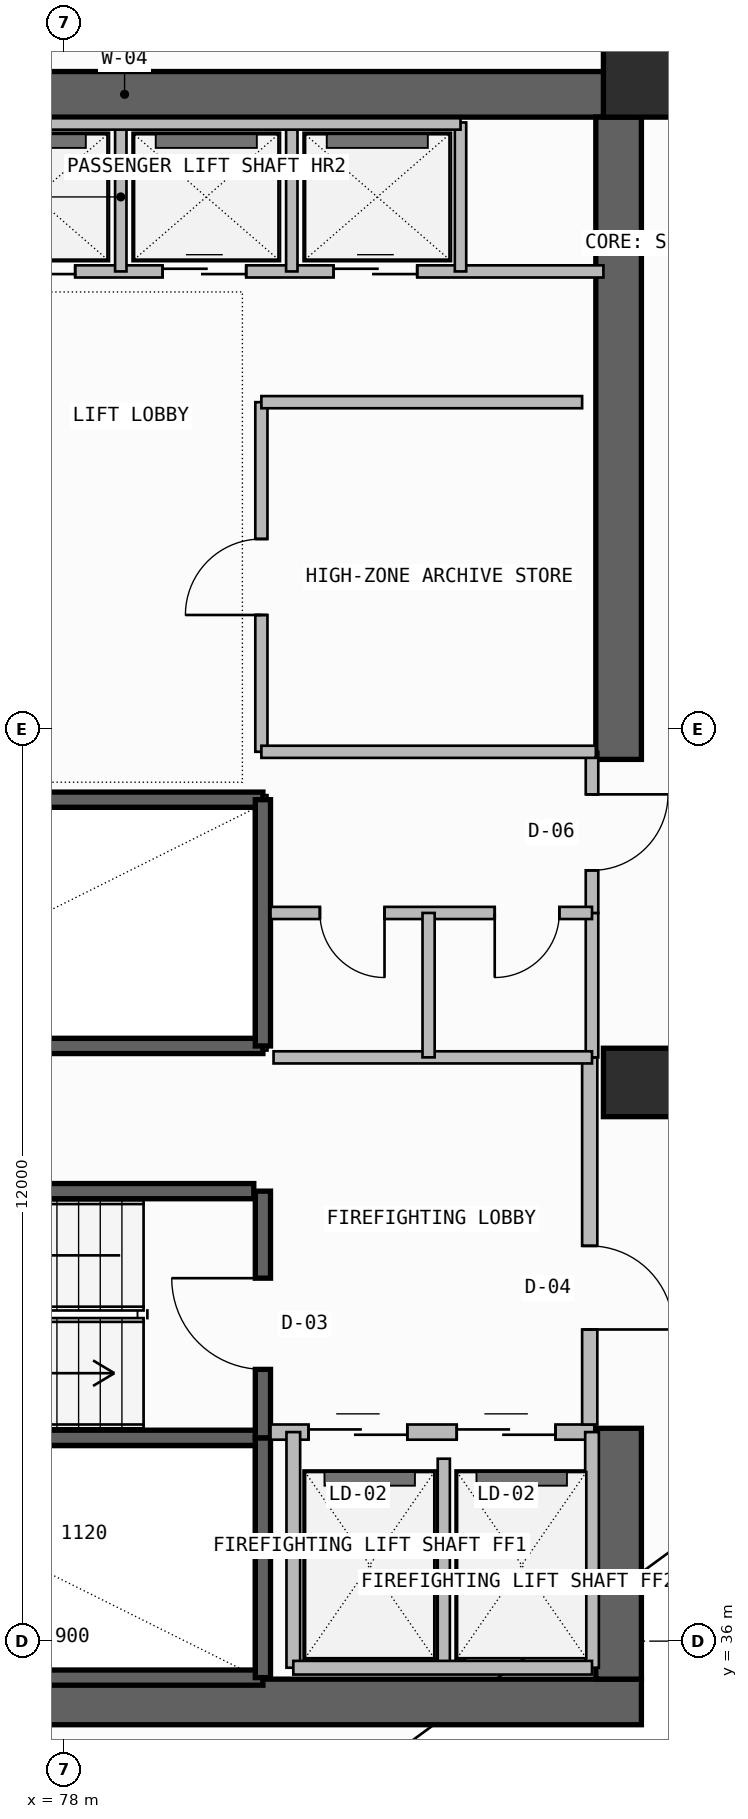
"""IFC4 building model, lengths in metres.
Left out: names, types, materials, properties, quantities, classifications, styles, units other than length and angle.
Written with IfcOpenShell. Run it as: python <this file> out.ifc"""

import sys

from ifc_helpers import new_model, si_unit, direction, frame, frame_2d, origin, origin_2d, place, context, subcontext, project, spatial, rectangle, extrude, element, fill, save


model = new_model("IFC4")
c1 = context("Model", 3, precision=1e-05, world=origin(), true_north=direction((0.0, 1.0)))
c2 = subcontext(c1, "Body", "Model", "MODEL_VIEW")
j1 = project(units=[si_unit("LENGTHUNIT", "METRE"), si_unit("PLANEANGLEUNIT", "RADIAN")], contexts=[c1])
p1 = place(None, origin())
s1 = spatial("IfcSite", under=j1, at=p1, CompositionType="ELEMENT")
p2 = place(p1, origin())
s2 = spatial("IfcBuilding", under=s1, at=p2, CompositionType="ELEMENT")
p3 = place(p2, frame((0.0, 0.0, 239.62)))
s3 = spatial("IfcBuildingStorey", under=s2, at=p3, CompositionType="ELEMENT", Elevation=239.62)
p4 = place(p3, frame((72.3, 35.2, -0.26), z_axis=(0.0, 0.0, 1.0), x_axis=(1.0, 0.0, 0.0)))
e1 = element("IfcWall", 1, at=p4, inside=s3, PredefinedType="SHEAR", context=c2, shape_type="SweptSolid", body=[
    extrude(rectangle(XDim=13.3, YDim=0.6, at=frame_2d((6.65, 0.0))), origin(), (0.0, 0.0, 1.0), 3.52),
])
p5 = place(p3, frame((85.3, 35.5, -0.26), z_axis=(0.0, 0.0, 1.0), x_axis=(0.0, 1.0, 0.0)))
e2 = element("IfcWall", 2, at=p5, inside=s3, PredefinedType="SHEAR", context=c2, shape_type="SweptSolid", body=[
    extrude(rectangle(XDim=3.3, YDim=0.6, at=frame_2d((1.65, 0.0))), origin(), (0.0, 0.0, 1.0), 3.52),
])
p6 = place(p3, frame((72.0, 56.35, -0.26), z_axis=(0.0, 0.0, 1.0), x_axis=(1.0, 0.0, 0.0)))
e3 = element("IfcWall", 3, at=p6, inside=s3, PredefinedType="SHEAR", context=c2, shape_type="SweptSolid", body=[
    extrude(rectangle(XDim=13.6, YDim=0.6, at=frame_2d((6.8, 0.0))), origin(), (0.0, 0.0, 1.0), 3.52),
])
p7 = place(p3, frame((85.3, 47.6, -0.26), z_axis=(0.0, 0.0, 1.0), x_axis=(0.0, 1.0, 0.0)))
e4 = element("IfcWall", 4, at=p7, inside=s3, PredefinedType="SHEAR", context=c2, shape_type="SweptSolid", body=[
    extrude(rectangle(XDim=8.45, YDim=0.6, at=frame_2d((4.225, 0.0))), origin(), (0.0, 0.0, 1.0), 3.52),
])
for number, where, z_axis, x_axis in (
    (5, (85.55, 43.35, 0.0), (0.0, 0.0, 1.0), (1.0, 0.0, 0.0)),
    (6, (85.55, 56.5, 0.0), (0.0, 0.0, 1.0), (1.0, 0.0, 0.0)),
):
    element("IfcColumn", number, at=place(p3, frame(where, z_axis=z_axis, x_axis=x_axis)), inside=s3, PredefinedType="COLUMN", context=c2, shape_type="SweptSolid", body=[
        extrude(rectangle(XDim=0.9, YDim=0.9, at=origin_2d()), origin(), (0.0, 0.0, 1.0), 3.52),
    ])
for number, where, z_axis, x_axis in (
    (7, (72.92, 35.52, -0.26), (0.0, 0.0, 1.0), (1.0, 0.0, 0.0)),
    (8, (72.92, 38.675, -0.26), (0.0, 0.0, 1.0), (1.0, 0.0, 0.0)),
):
    element("IfcWall", number, at=place(p3, frame(where, z_axis=z_axis, x_axis=x_axis)), inside=s3, PredefinedType="SOLIDWALL", context=c2, shape_type="SweptSolid", body=[
        extrude(rectangle(XDim=7.7, YDim=0.2, at=frame_2d((3.85, 0.0))), origin(), (0.0, 0.0, 1.0), 3.52),
    ])
p8 = place(p3, frame((80.62, 35.52, -0.26), z_axis=(0.0, 0.0, 1.0), x_axis=(0.0, 1.0, 0.0)))
e9 = element("IfcWall", 9, at=p8, inside=s3, PredefinedType="SOLIDWALL", context=c2, shape_type="SweptSolid", body=[
    extrude(rectangle(XDim=3.155, YDim=0.2, at=frame_2d((1.578, 0.0))), origin(), (0.0, 0.0, 1.0), 3.52),
])
p9 = place(p3, frame((80.62, 38.675, -0.26), z_axis=(0.0, 0.0, 1.0), x_axis=(0.0, 1.0, 0.0)))
e10 = element("IfcWall", 10, at=p9, inside=s3, PredefinedType="SOLIDWALL", context=c2, shape_type="SweptSolid", body=[
    extrude(rectangle(XDim=3.245, YDim=0.2, at=frame_2d((1.623, 0.0))), origin(), (0.0, 0.0, 1.0), 3.52),
])
p10 = place(p9, frame((0.9, 0.0, 0.26)))
e11 = element("IfcOpeningElement", 11, at=p10, cuts=e10, PredefinedType="OPENING", context=c2, shape_type="SweptSolid", body=[
    extrude(rectangle(XDim=1.2, YDim=2.2, at=frame_2d((0.6, 1.1))), frame((0.0, 0.11, 0.0), z_axis=(0.0, -1.0, 0.0), x_axis=(1.0, 0.0, 0.0)), (0.0, 0.0, 1.0), 0.22),
])
p11 = place(p3, frame((80.72, 38.75, 0.0), z_axis=(0.0, 0.0, 1.0), x_axis=(1.0, 0.0, 0.0)))
e12 = element("IfcWall", 12, at=p11, inside=s3, PredefinedType="SOLIDWALL", context=c2, shape_type="SweptSolid", body=[
    extrude(rectangle(XDim=4.26, YDim=0.2, at=frame_2d((2.13, 0.0))), origin(), (0.0, 0.0, 1.0), 3.26),
])
p12 = place(p11, frame((0.5, 0.0, 0.0)))
e13 = element("IfcOpeningElement", 13, at=p12, cuts=e12, PredefinedType="OPENING", context=c2, shape_type="SweptSolid", body=[
    extrude(rectangle(XDim=1.3, YDim=2.3, at=frame_2d((0.65, 1.15))), frame((0.0, 0.11, 0.0), z_axis=(0.0, -1.0, 0.0), x_axis=(1.0, 0.0, 0.0)), (0.0, 0.0, 1.0), 0.22),
])
p13 = place(p11, frame((2.45, 0.0, 0.0)))
e14 = element("IfcOpeningElement", 14, at=p13, cuts=e12, PredefinedType="OPENING", context=c2, shape_type="SweptSolid", body=[
    extrude(rectangle(XDim=1.3, YDim=2.3, at=frame_2d((0.65, 1.15))), frame((0.0, 0.11, 0.0), z_axis=(0.0, -1.0, 0.0), x_axis=(1.0, 0.0, 0.0)), (0.0, 0.0, 1.0), 0.22),
])
p14 = place(p3, frame((83.0, 35.65, 0.0), z_axis=(0.0, 0.0, 1.0), x_axis=(0.0, 1.0, 0.0)))
e15 = element("IfcWall", 15, at=p14, inside=s3, PredefinedType="PLUMBINGWALL", context=c2, shape_type="SweptSolid", body=[
    extrude(rectangle(XDim=2.75, YDim=0.16, at=frame_2d((1.375, 0.0))), origin(), (0.0, 0.0, 1.0), 3.26),
])
for number, where, z_axis, x_axis in (
    (16, (84.95, 35.65, 0.0), (0.0, 0.0, 1.0), (0.0, 1.0, 0.0)),
    (17, (81.02, 35.65, 0.0), (0.0, 0.0, 1.0), (0.0, 1.0, 0.0)),
):
    element("IfcWall", number, at=place(p3, frame(where, z_axis=z_axis, x_axis=x_axis)), inside=s3, PredefinedType="SOLIDWALL", context=c2, shape_type="SweptSolid", body=[
        extrude(rectangle(XDim=3.1, YDim=0.18, at=frame_2d((1.55, 0.0))), origin(), (0.0, 0.0, 1.0), 3.26),
    ])
p15 = place(p3, frame((81.02, 35.65, 0.0), z_axis=(0.0, 0.0, 1.0), x_axis=(1.0, 0.0, 0.0)))
e18 = element("IfcWall", 18, at=p15, inside=s3, PredefinedType="SOLIDWALL", context=c2, shape_type="SweptSolid", body=[
    extrude(rectangle(XDim=3.93, YDim=0.18, at=frame_2d((1.965, 0.0))), origin(), (0.0, 0.0, 1.0), 3.26),
])
p16 = place(p3, frame((84.92, 38.85, 0.0), z_axis=(0.0, 0.0, 1.0), x_axis=(0.0, 1.0, 0.0)))
e19 = element("IfcWall", 19, at=p16, inside=s3, PredefinedType="SOLIDWALL", context=c2, shape_type="SweptSolid", body=[
    extrude(rectangle(XDim=4.83, YDim=0.2, at=frame_2d((2.415, 0.0))), origin(), (0.0, 0.0, 1.0), 3.26),
])
p17 = place(p16, frame((1.25, 0.0, 0.0)))
e20 = element("IfcOpeningElement", 20, at=p17, cuts=e19, PredefinedType="OPENING", context=c2, shape_type="SweptSolid", body=[
    extrude(rectangle(XDim=1.1, YDim=2.2, at=frame_2d((0.55, 1.1))), frame((0.0, 0.11, 0.0), z_axis=(0.0, -1.0, 0.0), x_axis=(1.0, 0.0, 0.0)), (0.0, 0.0, 1.0), 0.22),
])
p18 = place(p3, frame((72.92, 41.92, -0.26), z_axis=(0.0, 0.0, 1.0), x_axis=(1.0, 0.0, 0.0)))
e21 = element("IfcWall", 21, at=p18, inside=s3, PredefinedType="SOLIDWALL", context=c2, shape_type="SweptSolid", body=[
    extrude(rectangle(XDim=7.58, YDim=0.2, at=frame_2d((3.79, 0.0))), origin(), (0.0, 0.0, 1.0), 3.52),
])
for number, where, z_axis, x_axis in (
    (22, (72.92, 43.83, -0.26), (0.0, 0.0, 1.0), (1.0, 0.0, 0.0)),
    (23, (72.92, 47.07, -0.26), (0.0, 0.0, 1.0), (1.0, 0.0, 0.0)),
):
    element("IfcWall", number, at=place(p3, frame(where, z_axis=z_axis, x_axis=x_axis)), inside=s3, PredefinedType="SOLIDWALL", context=c2, shape_type="SweptSolid", body=[
        extrude(rectangle(XDim=7.7, YDim=0.2, at=frame_2d((3.85, 0.0))), origin(), (0.0, 0.0, 1.0), 3.52),
    ])
p19 = place(p3, frame((80.62, 43.83, -0.26), z_axis=(0.0, 0.0, 1.0), x_axis=(0.0, 1.0, 0.0)))
e24 = element("IfcWall", 24, at=p19, inside=s3, PredefinedType="SOLIDWALL", context=c2, shape_type="SweptSolid", body=[
    extrude(rectangle(XDim=3.24, YDim=0.2, at=frame_2d((1.62, 0.0))), origin(), (0.0, 0.0, 1.0), 3.52),
])
p20 = place(p3, frame((84.95, 43.68, 0.0), z_axis=(0.0, 0.0, 1.0), x_axis=(0.0, 1.0, 0.0)))
e25 = element("IfcWall", 25, at=p20, inside=s3, PredefinedType="PLUMBINGWALL", context=c2, shape_type="SweptSolid", body=[
    extrude(rectangle(XDim=1.9, YDim=0.165, at=frame_2d((0.95, 0.0))), origin(), (0.0, 0.0, 1.0), 3.26),
])
p21 = place(p3, frame((84.95, 45.58, 0.0), z_axis=(0.0, 0.0, 1.0), x_axis=(0.0, 1.0, 0.0)))
e26 = element("IfcWall", 26, at=p21, inside=s3, PredefinedType="PARTITIONING", context=c2, shape_type="SweptSolid", body=[
    extrude(rectangle(XDim=2.12, YDim=0.165, at=frame_2d((1.06, 0.0))), origin(), (0.0, 0.0, 1.0), 3.26),
])
p22 = place(p21, frame((0.56, 0.0, 0.0)))
e27 = element("IfcOpeningElement", 27, at=p22, cuts=e26, PredefinedType="OPENING", context=c2, shape_type="SweptSolid", body=[
    extrude(rectangle(XDim=1.0, YDim=2.2, at=frame_2d((0.5, 1.1))), frame((0.0, 0.093, 0.0), z_axis=(0.0, -1.0, 0.0), x_axis=(1.0, 0.0, 0.0)), (0.0, 0.0, 1.0), 0.185),
])
p23 = place(p3, frame((80.72, 45.58, 0.0), z_axis=(0.0, 0.0, 1.0), x_axis=(1.0, 0.0, 0.0)))
e28 = element("IfcWall", 28, at=p23, inside=s3, PredefinedType="PLUMBINGWALL", context=c2, shape_type="SweptSolid", body=[
    extrude(rectangle(XDim=4.23, YDim=0.16, at=frame_2d((2.115, 0.0))), origin(), (0.0, 0.0, 1.0), 3.26),
])
p24 = place(p23, frame((0.65, 0.0, 0.0)))
e29 = element("IfcOpeningElement", 29, at=p24, cuts=e28, PredefinedType="OPENING", context=c2, shape_type="SweptSolid", body=[
    extrude(rectangle(XDim=0.85, YDim=2.05, at=frame_2d((0.425, 1.025))), frame((0.0, 0.09, 0.0), z_axis=(0.0, -1.0, 0.0), x_axis=(1.0, 0.0, 0.0)), (0.0, 0.0, 1.0), 0.18),
])
p25 = place(p23, frame((2.95, 0.0, 0.0)))
e30 = element("IfcOpeningElement", 30, at=p25, cuts=e28, PredefinedType="OPENING", context=c2, shape_type="SweptSolid", body=[
    extrude(rectangle(XDim=0.85, YDim=2.05, at=frame_2d((0.425, 1.025))), frame((0.0, 0.09, 0.0), z_axis=(0.0, -1.0, 0.0), x_axis=(1.0, 0.0, 0.0)), (0.0, 0.0, 1.0), 0.18),
])
p26 = place(p3, frame((80.76, 43.68, 0.0), z_axis=(0.0, 0.0, 1.0), x_axis=(1.0, 0.0, 0.0)))
e31 = element("IfcWall", 31, at=p26, inside=s3, PredefinedType="PLUMBINGWALL", context=c2, shape_type="SweptSolid", body=[
    extrude(rectangle(XDim=4.19, YDim=0.16, at=frame_2d((2.095, 0.0))), origin(), (0.0, 0.0, 1.0), 3.26),
])
p27 = place(p3, frame((82.8, 43.68, 0.0), z_axis=(0.0, 0.0, 1.0), x_axis=(0.0, 1.0, 0.0)))
e32 = element("IfcWall", 32, at=p27, inside=s3, PredefinedType="PLUMBINGWALL", context=c2, shape_type="SweptSolid", body=[
    extrude(rectangle(XDim=1.9, YDim=0.16, at=frame_2d((0.95, 0.0))), origin(), (0.0, 0.0, 1.0), 3.26),
])
p28 = place(p3, frame((80.6, 47.7, 0.0), z_axis=(0.0, 0.0, 1.0), x_axis=(0.0, 1.0, 0.0)))
e33 = element("IfcWall", 33, at=p28, inside=s3, PredefinedType="SOLIDWALL", context=c2, shape_type="SweptSolid", body=[
    extrude(rectangle(XDim=4.6, YDim=0.16, at=frame_2d((2.3, 0.0))), origin(), (0.0, 0.0, 1.0), 3.26),
])
p29 = place(p28, frame((1.8, 0.0, 0.0)))
e34 = element("IfcOpeningElement", 34, at=p29, cuts=e33, PredefinedType="OPENING", context=c2, shape_type="SweptSolid", body=[
    extrude(rectangle(XDim=1.0, YDim=2.2, at=frame_2d((0.5, 1.1))), frame((0.0, 0.09, 0.0), z_axis=(0.0, -1.0, 0.0), x_axis=(1.0, 0.0, 0.0)), (0.0, 0.0, 1.0), 0.18),
])
p30 = place(p3, frame((80.6, 47.7, 0.0), z_axis=(0.0, 0.0, 1.0), x_axis=(1.0, 0.0, 0.0)))
e35 = element("IfcWall", 35, at=p30, inside=s3, PredefinedType="SOLIDWALL", context=c2, shape_type="SweptSolid", body=[
    extrude(rectangle(XDim=4.4, YDim=0.16, at=frame_2d((2.2, 0.0))), origin(), (0.0, 0.0, 1.0), 3.26),
])
p31 = place(p3, frame((80.6, 52.3, 0.0), z_axis=(0.0, 0.0, 1.0), x_axis=(1.0, 0.0, 0.0)))
e36 = element("IfcWall", 36, at=p31, inside=s3, PredefinedType="SOLIDWALL", context=c2, shape_type="SweptSolid", body=[
    extrude(rectangle(XDim=4.22, YDim=0.16, at=frame_2d((2.11, 0.0))), origin(), (0.0, 0.0, 1.0), 3.26),
])
p32 = place(p3, frame((73.02, 54.02, 0.0), z_axis=(0.0, 0.0, 1.0), x_axis=(1.0, 0.0, 0.0)))
e37 = element("IfcWall", 37, at=p32, inside=s3, PredefinedType="SOLIDWALL", context=c2, shape_type="SweptSolid", body=[
    extrude(rectangle(XDim=12.08, YDim=0.16, at=frame_2d((6.04, 0.0))), origin(), (0.0, 0.0, 1.0), 3.26),
])
p33 = place(p32, frame((4.03, 0.0, 0.0)))
e38 = element("IfcOpeningElement", 38, at=p33, cuts=e37, PredefinedType="OPENING", context=c2, shape_type="SweptSolid", body=[
    extrude(rectangle(XDim=1.1, YDim=2.25, at=frame_2d((0.55, 1.125))), frame((0.0, 0.09, 0.0), z_axis=(0.0, -1.0, 0.0), x_axis=(1.0, 0.0, 0.0)), (0.0, 0.0, 1.0), 0.18),
])
p34 = place(p32, frame((6.28, 0.0, 0.0)))
e39 = element("IfcOpeningElement", 39, at=p34, cuts=e37, PredefinedType="OPENING", context=c2, shape_type="SweptSolid", body=[
    extrude(rectangle(XDim=1.1, YDim=2.25, at=frame_2d((0.55, 1.125))), frame((0.0, 0.09, 0.0), z_axis=(0.0, -1.0, 0.0), x_axis=(1.0, 0.0, 0.0)), (0.0, 0.0, 1.0), 0.18),
])
p35 = place(p32, frame((8.53, 0.0, 0.0)))
e40 = element("IfcOpeningElement", 40, at=p35, cuts=e37, PredefinedType="OPENING", context=c2, shape_type="SweptSolid", body=[
    extrude(rectangle(XDim=1.1, YDim=2.25, at=frame_2d((0.55, 1.125))), frame((0.0, 0.09, 0.0), z_axis=(0.0, -1.0, 0.0), x_axis=(1.0, 0.0, 0.0)), (0.0, 0.0, 1.0), 0.18),
])
for number, where, z_axis, x_axis in (
    (41, (78.75, 54.02, 0.0), (0.0, 0.0, 1.0), (0.0, 1.0, 0.0)),
    (42, (81.0, 54.02, 0.0), (0.0, 0.0, 1.0), (0.0, 1.0, 0.0)),
):
    element("IfcWall", number, at=place(p3, frame(where, z_axis=z_axis, x_axis=x_axis)), inside=s3, PredefinedType="PLUMBINGWALL", context=c2, shape_type="SweptSolid", body=[
        extrude(rectangle(XDim=1.96, YDim=0.15, at=frame_2d((0.98, 0.0))), origin(), (0.0, 0.0, 1.0), 3.26),
    ])
p36 = place(p3, frame((83.22, 54.02, 0.0), z_axis=(0.0, 0.0, 1.0), x_axis=(0.0, 1.0, 0.0)))
e43 = element("IfcWall", 43, at=p36, inside=s3, PredefinedType="SOLIDWALL", context=c2, shape_type="SweptSolid", body=[
    extrude(rectangle(XDim=1.96, YDim=0.15, at=frame_2d((0.98, 0.0))), origin(), (0.0, 0.0, 1.0), 3.26),
])
p37 = place(p3, frame((76.52, 55.96, 0.0), z_axis=(0.0, 0.0, 1.0), x_axis=(1.0, 0.0, 0.0)))
e44 = element("IfcWall", 44, at=p37, inside=s3, PredefinedType="SOLIDWALL", context=c2, shape_type="SweptSolid", body=[
    extrude(rectangle(XDim=6.7, YDim=0.15, at=frame_2d((3.35, 0.0))), origin(), (0.0, 0.0, 1.0), 3.26),
])
p38 = place(p10, origin())
e45 = element("IfcDoor", 45, at=p38, inside=s3, OperationType="SINGLE_SWING_RIGHT", PredefinedType="USERDEFINED", context=c2, shape_type="SweptSolid", body=[
    extrude(rectangle(XDim=1.2, YDim=2.2, at=frame_2d((0.6, 1.1))), frame((0.0, 0.025, 0.0), z_axis=(0.0, -1.0, 0.0), x_axis=(1.0, 0.0, 0.0)), (0.0, 0.0, 1.0), 0.05),
])
fill(e11, e45)
p39 = place(p12, origin())
e46 = element("IfcDoor", 46, at=p39, inside=s3, OperationType="DOUBLE_DOOR_SLIDING", PredefinedType="DOOR", context=c2, shape_type="SweptSolid", body=[
    extrude(rectangle(XDim=1.3, YDim=2.3, at=frame_2d((0.65, 1.15))), frame((0.0, 0.025, 0.0), z_axis=(0.0, -1.0, 0.0), x_axis=(1.0, 0.0, 0.0)), (0.0, 0.0, 1.0), 0.05),
])
fill(e13, e46)
p40 = place(p13, origin())
e47 = element("IfcDoor", 47, at=p40, inside=s3, OperationType="DOUBLE_DOOR_SLIDING", PredefinedType="DOOR", context=c2, shape_type="SweptSolid", body=[
    extrude(rectangle(XDim=1.3, YDim=2.3, at=frame_2d((0.65, 1.15))), frame((0.0, 0.025, 0.0), z_axis=(0.0, -1.0, 0.0), x_axis=(1.0, 0.0, 0.0)), (0.0, 0.0, 1.0), 0.05),
])
fill(e14, e47)
p41 = place(p17, frame((1.1, 0.0, 0.0), z_axis=(0.0, 0.0, 1.0), x_axis=(-1.0, 0.0, 0.0)))
e48 = element("IfcDoor", 48, at=p41, inside=s3, OperationType="SINGLE_SWING_RIGHT", PredefinedType="DOOR", context=c2, shape_type="SweptSolid", body=[
    extrude(rectangle(XDim=1.1, YDim=2.2, at=frame_2d((0.55, 1.1))), frame((0.0, 0.025, 0.0), z_axis=(0.0, -1.0, 0.0), x_axis=(1.0, 0.0, 0.0)), (0.0, 0.0, 1.0), 0.05),
])
fill(e20, e48)
p42 = place(p22, frame((1.0, 0.0, 0.0), z_axis=(0.0, 0.0, 1.0), x_axis=(-1.0, 0.0, 0.0)))
e49 = element("IfcDoor", 49, at=p42, inside=s3, OperationType="SINGLE_SWING_LEFT", PredefinedType="DOOR", context=c2, shape_type="SweptSolid", body=[
    extrude(rectangle(XDim=1.0, YDim=2.2, at=frame_2d((0.5, 1.1))), frame((0.0, 0.025, 0.0), z_axis=(0.0, -1.0, 0.0), x_axis=(1.0, 0.0, 0.0)), (0.0, 0.0, 1.0), 0.05),
])
fill(e27, e49)
p43 = place(p24, frame((0.85, 0.0, 0.0), z_axis=(0.0, 0.0, 1.0), x_axis=(-1.0, 0.0, 0.0)))
e50 = element("IfcDoor", 50, at=p43, inside=s3, OperationType="SINGLE_SWING_LEFT", PredefinedType="DOOR", context=c2, shape_type="SweptSolid", body=[
    extrude(rectangle(XDim=0.85, YDim=2.05, at=frame_2d((0.425, 1.025))), frame((0.0, 0.025, 0.0), z_axis=(0.0, -1.0, 0.0), x_axis=(1.0, 0.0, 0.0)), (0.0, 0.0, 1.0), 0.05),
])
fill(e29, e50)
p44 = place(p25, frame((0.85, 0.0, 0.0), z_axis=(0.0, 0.0, 1.0), x_axis=(-1.0, 0.0, 0.0)))
e51 = element("IfcDoor", 51, at=p44, inside=s3, OperationType="SINGLE_SWING_RIGHT", PredefinedType="DOOR", context=c2, shape_type="SweptSolid", body=[
    extrude(rectangle(XDim=0.85, YDim=2.05, at=frame_2d((0.425, 1.025))), frame((0.0, 0.025, 0.0), z_axis=(0.0, -1.0, 0.0), x_axis=(1.0, 0.0, 0.0)), (0.0, 0.0, 1.0), 0.05),
])
fill(e30, e51)
p45 = place(p29, origin())
e52 = element("IfcDoor", 52, at=p45, inside=s3, OperationType="SINGLE_SWING_LEFT", PredefinedType="DOOR", context=c2, shape_type="SweptSolid", body=[
    extrude(rectangle(XDim=1.0, YDim=2.2, at=frame_2d((0.5, 1.1))), frame((0.0, 0.025, 0.0), z_axis=(0.0, -1.0, 0.0), x_axis=(1.0, 0.0, 0.0)), (0.0, 0.0, 1.0), 0.05),
])
fill(e34, e52)
p46 = place(p33, origin())
e53 = element("IfcDoor", 53, at=p46, inside=s3, OperationType="DOUBLE_DOOR_SLIDING", PredefinedType="DOOR", context=c2, shape_type="SweptSolid", body=[
    extrude(rectangle(XDim=1.1, YDim=2.25, at=frame_2d((0.55, 1.125))), frame((0.0, 0.025, 0.0), z_axis=(0.0, -1.0, 0.0), x_axis=(1.0, 0.0, 0.0)), (0.0, 0.0, 1.0), 0.05),
])
fill(e38, e53)
p47 = place(p34, origin())
e54 = element("IfcDoor", 54, at=p47, inside=s3, OperationType="DOUBLE_DOOR_SLIDING", PredefinedType="DOOR", context=c2, shape_type="SweptSolid", body=[
    extrude(rectangle(XDim=1.1, YDim=2.25, at=frame_2d((0.55, 1.125))), frame((0.0, 0.025, 0.0), z_axis=(0.0, -1.0, 0.0), x_axis=(1.0, 0.0, 0.0)), (0.0, 0.0, 1.0), 0.05),
])
fill(e39, e54)
p48 = place(p35, origin())
e55 = element("IfcDoor", 55, at=p48, inside=s3, OperationType="DOUBLE_DOOR_SLIDING", PredefinedType="DOOR", context=c2, shape_type="SweptSolid", body=[
    extrude(rectangle(XDim=1.1, YDim=2.25, at=frame_2d((0.55, 1.125))), frame((0.0, 0.025, 0.0), z_axis=(0.0, -1.0, 0.0), x_axis=(1.0, 0.0, 0.0)), (0.0, 0.0, 1.0), 0.05),
])
fill(e40, e55)
save(model, sys.argv[1])
